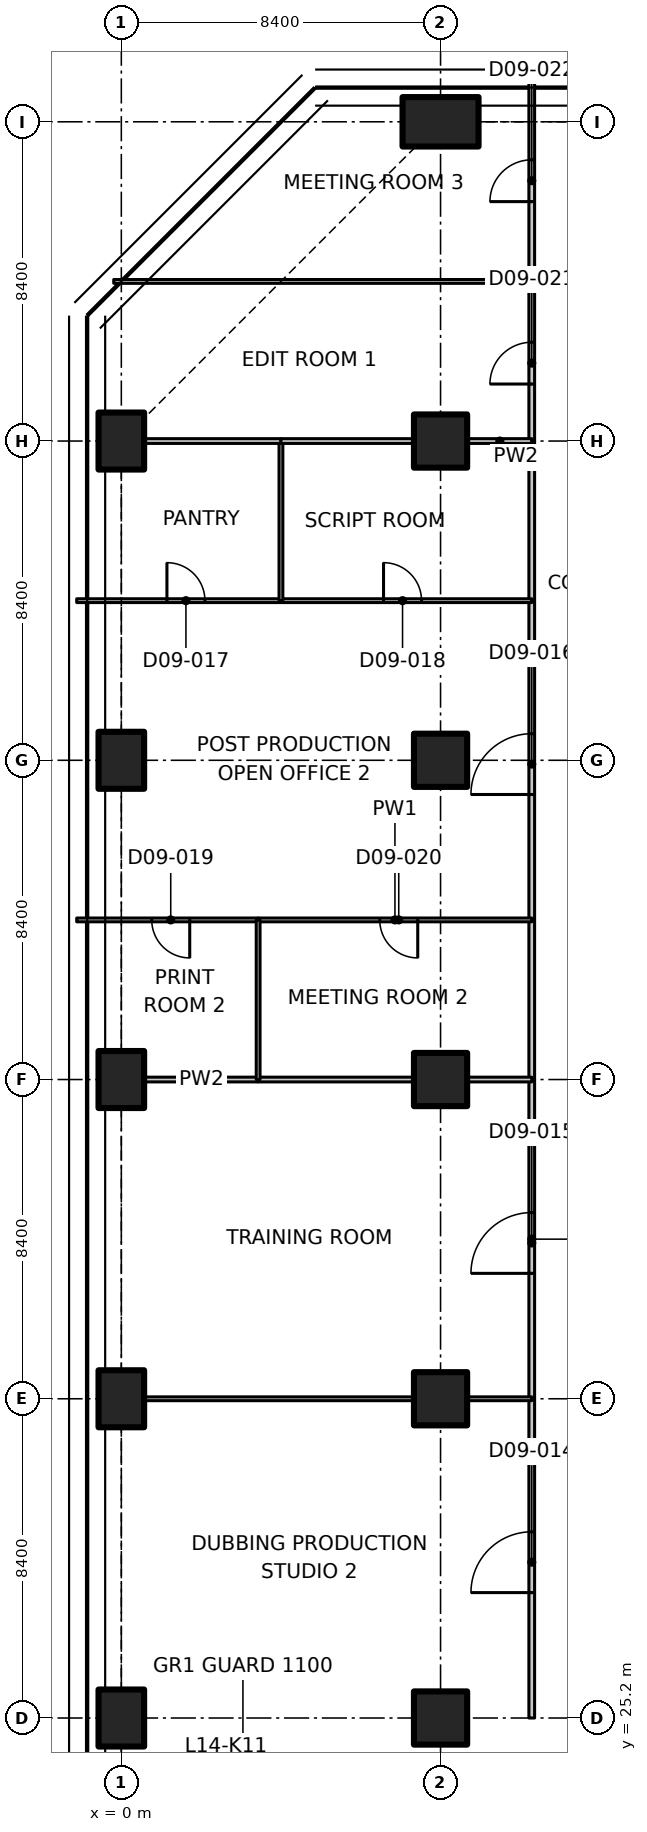
"""IFC4 building model, lengths in metres.
Left out: names, types, materials, properties, quantities, classifications, styles, units other than length and angle.
Written with IfcOpenShell. Run it as: python <this file> out.ifc"""

import sys

from ifc_helpers import new_model, si_unit, direction, frame, frame_2d, origin, origin_2d, place, context, subcontext, project, spatial, polyline, rectangle, outline, extrude, element, fill, save


model = new_model("IFC4")
c1 = context("Model", 3, precision=1e-05, world=origin(), true_north=direction((0.0, 1.0)))
c2 = subcontext(c1, "Body", "Model", "MODEL_VIEW")
j1 = project(units=[si_unit("LENGTHUNIT", "METRE"), si_unit("PLANEANGLEUNIT", "RADIAN")], contexts=[c1])
p1 = place(None, origin())
s1 = spatial("IfcSite", under=j1, at=p1, CompositionType="ELEMENT")
p2 = place(p1, origin())
s2 = spatial("IfcBuilding", under=s1, at=p2, CompositionType="ELEMENT")
p3 = place(p2, frame((0.0, 0.0, 65.3)))
s3 = spatial("IfcBuildingStorey", under=s2, at=p3, CompositionType="ELEMENT", Elevation=65.3)
for number, where, z_axis, x_axis in (
    (1, (0.0, 25.2, 0.0), (0.0, 0.0, 1.0), (1.0, 0.0, 0.0)),
    (2, (0.0, 33.6, 0.0), (0.0, 0.0, 1.0), (1.0, 0.0, 0.0)),
    (3, (0.0, 42.0, 0.0), (0.0, 0.0, 1.0), (1.0, 0.0, 0.0)),
    (4, (0.0, 50.4, 0.0), (0.0, 0.0, 1.0), (1.0, 0.0, 0.0)),
    (5, (0.0, 58.8, 0.0), (0.0, 0.0, 1.0), (1.0, 0.0, 0.0)),
):
    element("IfcColumn", number, at=place(p3, frame(where, z_axis=z_axis, x_axis=x_axis)), inside=s3, PredefinedType="COLUMN", context=c2, shape_type="SweptSolid", body=[
        extrude(rectangle(XDim=1.2, YDim=1.5, at=origin_2d()), origin(), (0.0, 0.0, 1.0), 3.35),
    ])
for number, where, z_axis, x_axis in (
    (6, (8.4, 25.2, 0.0), (0.0, 0.0, 1.0), (1.0, 0.0, 0.0)),
    (7, (8.4, 33.6, 0.0), (0.0, 0.0, 1.0), (1.0, 0.0, 0.0)),
    (8, (8.4, 42.0, 0.0), (0.0, 0.0, 1.0), (1.0, 0.0, 0.0)),
    (9, (8.4, 50.4, 0.0), (0.0, 0.0, 1.0), (1.0, 0.0, 0.0)),
    (10, (8.4, 58.8, 0.0), (0.0, 0.0, 1.0), (1.0, 0.0, 0.0)),
):
    element("IfcColumn", number, at=place(p3, frame(where, z_axis=z_axis, x_axis=x_axis)), inside=s3, PredefinedType="COLUMN", context=c2, shape_type="SweptSolid", body=[
        extrude(rectangle(XDim=1.4, YDim=1.4, at=origin_2d()), origin(), (0.0, 0.0, 1.0), 3.35),
    ])
p4 = place(p3, frame((8.4, 67.2, 0.0), z_axis=(0.0, 0.0, 1.0), x_axis=(0.0, 1.0, 0.0)))
e11 = element("IfcColumn", 11, at=p4, inside=s3, PredefinedType="COLUMN", context=c2, shape_type="SweptSolid", body=[
    extrude(rectangle(XDim=1.3, YDim=2.0, at=origin_2d()), origin(), (0.0, 0.0, 1.0), 3.35),
])
p5 = place(p3, frame((10.8, 25.2, 0.0), z_axis=(0.0, 0.0, 1.0), x_axis=(0.0, 1.0, 0.0)))
e12 = element("IfcWall", 12, at=p5, inside=s3, PredefinedType="PARTITIONING", context=c2, shape_type="SweptSolid", body=[
    extrude(rectangle(XDim=8.4, YDim=0.15, at=frame_2d((4.2, 0.0))), origin(), (0.0, 0.0, 1.0), 3.33),
])
p6 = place(p5, frame((3.3, 0.0, 0.0)))
e13 = element("IfcOpeningElement", 13, at=p6, cuts=e12, PredefinedType="OPENING", context=c2, shape_type="SweptSolid", body=[
    extrude(rectangle(XDim=1.6, YDim=2.1, at=frame_2d((0.8, 1.05))), frame((0.0, 0.085, 0.0), z_axis=(0.0, -1.0, 0.0), x_axis=(1.0, 0.0, 0.0)), (0.0, 0.0, 1.0), 0.17),
])
p7 = place(p3, frame((10.8, 33.6, 0.0), z_axis=(0.0, 0.0, 1.0), x_axis=(0.0, 1.0, 0.0)))
e14 = element("IfcWall", 14, at=p7, inside=s3, PredefinedType="PARTITIONING", context=c2, shape_type="SweptSolid", body=[
    extrude(rectangle(XDim=8.4, YDim=0.15, at=frame_2d((4.2, 0.0))), origin(), (0.0, 0.0, 1.0), 3.33),
])
p8 = place(p7, frame((3.3, 0.0, 0.0)))
e15 = element("IfcOpeningElement", 15, at=p8, cuts=e14, PredefinedType="OPENING", context=c2, shape_type="SweptSolid", body=[
    extrude(rectangle(XDim=1.6, YDim=2.1, at=frame_2d((0.8, 1.05))), frame((0.0, 0.085, 0.0), z_axis=(0.0, -1.0, 0.0), x_axis=(1.0, 0.0, 0.0)), (0.0, 0.0, 1.0), 0.17),
])
p9 = place(p3, frame((10.8, 46.2, 0.0), z_axis=(0.0, 0.0, 1.0), x_axis=(0.0, 1.0, 0.0)))
e16 = element("IfcWall", 16, at=p9, inside=s3, PredefinedType="PARTITIONING", context=c2, shape_type="SweptSolid", body=[
    extrude(rectangle(XDim=8.4, YDim=0.15, at=frame_2d((4.2, 0.0))), origin(), (0.0, 0.0, 1.0), 3.33),
])
p10 = place(p9, frame((3.3, 0.0, 0.0)))
e17 = element("IfcOpeningElement", 17, at=p10, cuts=e16, PredefinedType="OPENING", context=c2, shape_type="SweptSolid", body=[
    extrude(rectangle(XDim=1.6, YDim=2.1, at=frame_2d((0.8, 1.05))), frame((0.0, 0.085, 0.0), z_axis=(0.0, -1.0, 0.0), x_axis=(1.0, 0.0, 0.0)), (0.0, 0.0, 1.0), 0.17),
])
for number, where, z_axis, x_axis in (
    (18, (10.8, 54.6, 0.0), (0.0, 0.0, 1.0), (0.0, 1.0, 0.0)),
    (19, (10.8, 42.0, 0.0), (0.0, 0.0, 1.0), (0.0, 1.0, 0.0)),
):
    element("IfcWall", number, at=place(p3, frame(where, z_axis=z_axis, x_axis=x_axis)), inside=s3, PredefinedType="PARTITIONING", context=c2, shape_type="SweptSolid", body=[
        extrude(rectangle(XDim=4.2, YDim=0.15, at=frame_2d((2.1, 0.0))), origin(), (0.0, 0.0, 1.0), 3.33),
    ])
p11 = place(p3, frame((10.8, 58.8, 0.0), z_axis=(0.0, 0.0, 1.0), x_axis=(0.0, 1.0, 0.0)))
e20 = element("IfcWall", 20, at=p11, inside=s3, PredefinedType="PARTITIONING", context=c2, shape_type="SweptSolid", body=[
    extrude(rectangle(XDim=4.2, YDim=0.15, at=frame_2d((2.1, 0.0))), origin(), (0.0, 0.0, 1.0), 3.33),
])
p12 = place(p11, frame((1.5, 0.0, 0.0)))
e21 = element("IfcOpeningElement", 21, at=p12, cuts=e20, PredefinedType="OPENING", context=c2, shape_type="SweptSolid", body=[
    extrude(rectangle(XDim=1.1, YDim=2.1, at=frame_2d((0.55, 1.05))), frame((0.0, 0.085, 0.0), z_axis=(0.0, -1.0, 0.0), x_axis=(1.0, 0.0, 0.0)), (0.0, 0.0, 1.0), 0.17),
])
p13 = place(p3, frame((10.8, 63.0, 0.0), z_axis=(0.0, 0.0, 1.0), x_axis=(0.0, 1.0, 0.0)))
e22 = element("IfcWall", 22, at=p13, inside=s3, PredefinedType="PARTITIONING", context=c2, shape_type="SweptSolid", body=[
    extrude(outline(polyline([(0.0, 0.0), (5.423, 0.0), (5.423, 3.33), (5.28, 3.33), (4.65, 3.33), (4.648, 2.98), (3.752, 2.98), (3.75, 3.33), (0.0, 3.33), (0.0, 0.0)])), frame((0.0, 0.075, 0.0), z_axis=(0.0, -1.0, 0.0), x_axis=(1.0, 0.0, 0.0)), (0.0, 0.0, 1.0), 0.15),
])
p14 = place(p13, frame((2.1, 0.0, 0.0)))
e23 = element("IfcOpeningElement", 23, at=p14, cuts=e22, PredefinedType="OPENING", context=c2, shape_type="SweptSolid", body=[
    extrude(rectangle(XDim=1.1, YDim=2.1, at=frame_2d((0.55, 1.05))), frame((0.0, 0.085, 0.0), z_axis=(0.0, -1.0, 0.0), x_axis=(1.0, 0.0, 0.0)), (0.0, 0.0, 1.0), 0.17),
])
p15 = place(p3, frame((0.62, 33.6, 0.0), z_axis=(0.0, 0.0, 1.0), x_axis=(1.0, 0.0, 0.0)))
e24 = element("IfcWall", 24, at=p15, inside=s3, PredefinedType="PARTITIONING", context=c2, shape_type="SweptSolid", body=[
    extrude(rectangle(XDim=7.06, YDim=0.1, at=frame_2d((3.53, 0.0))), origin(), (0.0, 0.0, 1.0), 3.33),
])
p16 = place(p3, frame((9.12, 33.6, 0.0), z_axis=(0.0, 0.0, 1.0), x_axis=(1.0, 0.0, 0.0)))
e25 = element("IfcWall", 25, at=p16, inside=s3, PredefinedType="PARTITIONING", context=c2, shape_type="SweptSolid", body=[
    extrude(rectangle(XDim=1.68, YDim=0.1, at=frame_2d((0.84, 0.0))), origin(), (0.0, 0.0, 1.0), 3.33),
])
p17 = place(p3, frame((0.62, 42.0, 0.0), z_axis=(0.0, 0.0, 1.0), x_axis=(1.0, 0.0, 0.0)))
e26 = element("IfcWall", 26, at=p17, inside=s3, PredefinedType="PARTITIONING", context=c2, shape_type="SweptSolid", body=[
    extrude(rectangle(XDim=2.98, YDim=0.125, at=frame_2d((1.49, 0.0))), origin(), (0.0, 0.0, 1.0), 3.33),
])
p18 = place(p3, frame((3.6, 42.0, 0.0), z_axis=(0.0, 0.0, 1.0), x_axis=(1.0, 0.0, 0.0)))
e27 = element("IfcWall", 27, at=p18, inside=s3, PredefinedType="PARTITIONING", context=c2, shape_type="SweptSolid", body=[
    extrude(rectangle(XDim=4.08, YDim=0.125, at=frame_2d((2.04, 0.0))), origin(), (0.0, 0.0, 1.0), 3.33),
])
p19 = place(p3, frame((9.12, 42.0, 0.0), z_axis=(0.0, 0.0, 1.0), x_axis=(1.0, 0.0, 0.0)))
e28 = element("IfcWall", 28, at=p19, inside=s3, PredefinedType="PARTITIONING", context=c2, shape_type="SweptSolid", body=[
    extrude(rectangle(XDim=1.68, YDim=0.125, at=frame_2d((0.84, 0.0))), origin(), (0.0, 0.0, 1.0), 3.33),
])
p20 = place(p3, frame((-1.174, 54.6, 0.0), z_axis=(0.0, 0.0, 1.0), x_axis=(1.0, 0.0, 0.0)))
e29 = element("IfcWall", 29, at=p20, inside=s3, PredefinedType="PARTITIONING", context=c2, shape_type="SweptSolid", body=[
    extrude(outline(polyline([(0.0, 0.0), (5.374, 0.0), (5.374, 3.33), (1.624, 3.33), (1.622, 2.98), (0.726, 2.98), (0.724, 3.33), (0.074, 3.33), (0.0, 3.33), (0.0, 0.0)])), frame((0.0, 0.05, 0.0), z_axis=(0.0, -1.0, 0.0), x_axis=(1.0, 0.0, 0.0)), (0.0, 0.0, 1.0), 0.1),
])
p21 = place(p20, frame((2.374, 0.0, 0.0)))
e30 = element("IfcOpeningElement", 30, at=p21, cuts=e29, PredefinedType="OPENING", context=c2, shape_type="SweptSolid", body=[
    extrude(rectangle(XDim=1.0, YDim=2.1, at=frame_2d((0.5, 1.05))), frame((0.0, 0.06, 0.0), z_axis=(0.0, -1.0, 0.0), x_axis=(1.0, 0.0, 0.0)), (0.0, 0.0, 1.0), 0.12),
])
p22 = place(p3, frame((4.2, 54.6, 0.0), z_axis=(0.0, 0.0, 1.0), x_axis=(1.0, 0.0, 0.0)))
e31 = element("IfcWall", 31, at=p22, inside=s3, PredefinedType="PARTITIONING", context=c2, shape_type="SweptSolid", body=[
    extrude(rectangle(XDim=6.6, YDim=0.1, at=frame_2d((3.3, 0.0))), origin(), (0.0, 0.0, 1.0), 3.33),
])
p23 = place(p22, frame((2.7, 0.0, 0.0)))
e32 = element("IfcOpeningElement", 32, at=p23, cuts=e31, PredefinedType="OPENING", context=c2, shape_type="SweptSolid", body=[
    extrude(rectangle(XDim=1.0, YDim=2.1, at=frame_2d((0.5, 1.05))), frame((0.0, 0.06, 0.0), z_axis=(0.0, -1.0, 0.0), x_axis=(1.0, 0.0, 0.0)), (0.0, 0.0, 1.0), 0.12),
])
p24 = place(p3, frame((3.6, 46.2, 0.0), z_axis=(0.0, 0.0, 1.0), x_axis=(-1.0, 0.0, 0.0)))
e33 = element("IfcWall", 33, at=p24, inside=s3, PredefinedType="PARTITIONING", context=c2, shape_type="SweptSolid", body=[
    extrude(outline(polyline([(0.0, 0.0), (4.774, 0.0), (4.774, 3.33), (4.7, 3.33), (4.05, 3.33), (4.048, 2.98), (3.152, 2.98), (3.15, 3.33), (0.0, 3.33), (0.0, 0.0)])), frame((0.0, 0.05, 0.0), z_axis=(0.0, -1.0, 0.0), x_axis=(1.0, 0.0, 0.0)), (0.0, 0.0, 1.0), 0.1),
])
p25 = place(p24, frame((1.8, 0.0, 0.0)))
e34 = element("IfcOpeningElement", 34, at=p25, cuts=e33, PredefinedType="OPENING", context=c2, shape_type="SweptSolid", body=[
    extrude(rectangle(XDim=1.0, YDim=2.1, at=frame_2d((0.5, 1.05))), frame((0.0, 0.06, 0.0), z_axis=(0.0, -1.0, 0.0), x_axis=(1.0, 0.0, 0.0)), (0.0, 0.0, 1.0), 0.12),
])
p26 = place(p3, frame((10.8, 46.2, 0.0), z_axis=(0.0, 0.0, 1.0), x_axis=(-1.0, 0.0, 0.0)))
e35 = element("IfcWall", 35, at=p26, inside=s3, PredefinedType="PARTITIONING", context=c2, shape_type="SweptSolid", body=[
    extrude(rectangle(XDim=7.2, YDim=0.1, at=frame_2d((3.6, 0.0))), origin(), (0.0, 0.0, 1.0), 3.33),
])
p27 = place(p26, frame((3.0, 0.0, 0.0)))
e36 = element("IfcOpeningElement", 36, at=p27, cuts=e35, PredefinedType="OPENING", context=c2, shape_type="SweptSolid", body=[
    extrude(rectangle(XDim=1.0, YDim=2.1, at=frame_2d((0.5, 1.05))), frame((0.0, 0.06, 0.0), z_axis=(0.0, -1.0, 0.0), x_axis=(1.0, 0.0, 0.0)), (0.0, 0.0, 1.0), 0.12),
])
p28 = place(p3, frame((4.2, 58.8, 0.0), z_axis=(0.0, 0.0, 1.0), x_axis=(0.0, -1.0, 0.0)))
e37 = element("IfcWall", 37, at=p28, inside=s3, PredefinedType="PARTITIONING", context=c2, shape_type="SweptSolid", body=[
    extrude(rectangle(XDim=4.2, YDim=0.1, at=frame_2d((2.1, 0.0))), origin(), (0.0, 0.0, 1.0), 3.33),
])
p29 = place(p3, frame((0.62, 58.8, 0.0), z_axis=(0.0, 0.0, 1.0), x_axis=(1.0, 0.0, 0.0)))
e38 = element("IfcWall", 38, at=p29, inside=s3, PredefinedType="PARTITIONING", context=c2, shape_type="SweptSolid", body=[
    extrude(rectangle(XDim=3.58, YDim=0.125, at=frame_2d((1.79, 0.0))), origin(), (0.0, 0.0, 1.0), 3.33),
])
p30 = place(p3, frame((4.2, 58.8, 0.0), z_axis=(0.0, 0.0, 1.0), x_axis=(1.0, 0.0, 0.0)))
e39 = element("IfcWall", 39, at=p30, inside=s3, PredefinedType="PARTITIONING", context=c2, shape_type="SweptSolid", body=[
    extrude(rectangle(XDim=3.48, YDim=0.125, at=frame_2d((1.74, 0.0))), origin(), (0.0, 0.0, 1.0), 3.33),
])
p31 = place(p3, frame((9.12, 58.8, 0.0), z_axis=(0.0, 0.0, 1.0), x_axis=(1.0, 0.0, 0.0)))
e40 = element("IfcWall", 40, at=p31, inside=s3, PredefinedType="PARTITIONING", context=c2, shape_type="SweptSolid", body=[
    extrude(rectangle(XDim=1.68, YDim=0.125, at=frame_2d((0.84, 0.0))), origin(), (0.0, 0.0, 1.0), 3.33),
])
p32 = place(p3, frame((3.6, 46.2, 0.0), z_axis=(0.0, 0.0, 1.0), x_axis=(0.0, -1.0, 0.0)))
e41 = element("IfcWall", 41, at=p32, inside=s3, PredefinedType="PARTITIONING", context=c2, shape_type="SweptSolid", body=[
    extrude(rectangle(XDim=4.2, YDim=0.1, at=frame_2d((2.1, 0.0))), origin(), (0.0, 0.0, 1.0), 3.33),
])
p33 = place(p3, frame((-0.2, 63.0, 0.0), z_axis=(0.0, 0.0, 1.0), x_axis=(1.0, 0.0, 0.0)))
e42 = element("IfcWall", 42, at=p33, inside=s3, PredefinedType="PARTITIONING", context=c2, shape_type="SweptSolid", body=[
    extrude(outline(polyline([(0.0, 0.0), (11.0, 0.0), (11.0, 3.33), (5.066, 3.33), (5.064, 2.98), (3.736, 2.98), (3.734, 3.33), (0.0, 3.33), (0.0, 0.0)])), frame((0.0, 0.05, 0.0), z_axis=(0.0, -1.0, 0.0), x_axis=(1.0, 0.0, 0.0)), (0.0, 0.0, 1.0), 0.1),
])
p34 = place(p6, origin())
e43 = element("IfcDoor", 43, at=p34, inside=s3, OperationType="DOUBLE_DOOR_SINGLE_SWING", PredefinedType="DOOR", context=c2, shape_type="SweptSolid", body=[
    extrude(rectangle(XDim=1.6, YDim=2.1, at=frame_2d((0.8, 1.05))), frame((0.0, 0.025, 0.0), z_axis=(0.0, -1.0, 0.0), x_axis=(1.0, 0.0, 0.0)), (0.0, 0.0, 1.0), 0.05),
])
fill(e13, e43)
p35 = place(p8, origin())
e44 = element("IfcDoor", 44, at=p35, inside=s3, OperationType="DOUBLE_DOOR_SINGLE_SWING", PredefinedType="DOOR", context=c2, shape_type="SweptSolid", body=[
    extrude(rectangle(XDim=1.6, YDim=2.1, at=frame_2d((0.8, 1.05))), frame((0.0, 0.025, 0.0), z_axis=(0.0, -1.0, 0.0), x_axis=(1.0, 0.0, 0.0)), (0.0, 0.0, 1.0), 0.05),
])
fill(e15, e44)
p36 = place(p10, origin())
e45 = element("IfcDoor", 45, at=p36, inside=s3, OperationType="DOUBLE_DOOR_SINGLE_SWING", PredefinedType="DOOR", context=c2, shape_type="SweptSolid", body=[
    extrude(rectangle(XDim=1.6, YDim=2.1, at=frame_2d((0.8, 1.05))), frame((0.0, 0.025, 0.0), z_axis=(0.0, -1.0, 0.0), x_axis=(1.0, 0.0, 0.0)), (0.0, 0.0, 1.0), 0.05),
])
fill(e17, e45)
p37 = place(p21, origin())
e46 = element("IfcDoor", 46, at=p37, inside=s3, OperationType="SINGLE_SWING_LEFT", PredefinedType="DOOR", context=c2, shape_type="SweptSolid", body=[
    extrude(rectangle(XDim=1.0, YDim=2.1, at=frame_2d((0.5, 1.05))), frame((0.0, 0.025, 0.0), z_axis=(0.0, -1.0, 0.0), x_axis=(1.0, 0.0, 0.0)), (0.0, 0.0, 1.0), 0.05),
])
fill(e30, e46)
p38 = place(p23, origin())
e47 = element("IfcDoor", 47, at=p38, inside=s3, OperationType="SINGLE_SWING_LEFT", PredefinedType="DOOR", context=c2, shape_type="SweptSolid", body=[
    extrude(rectangle(XDim=1.0, YDim=2.1, at=frame_2d((0.5, 1.05))), frame((0.0, 0.025, 0.0), z_axis=(0.0, -1.0, 0.0), x_axis=(1.0, 0.0, 0.0)), (0.0, 0.0, 1.0), 0.05),
])
fill(e32, e47)
p39 = place(p25, origin())
e48 = element("IfcDoor", 48, at=p39, inside=s3, OperationType="SINGLE_SWING_LEFT", PredefinedType="DOOR", context=c2, shape_type="SweptSolid", body=[
    extrude(rectangle(XDim=1.0, YDim=2.1, at=frame_2d((0.5, 1.05))), frame((0.0, 0.025, 0.0), z_axis=(0.0, -1.0, 0.0), x_axis=(1.0, 0.0, 0.0)), (0.0, 0.0, 1.0), 0.05),
])
fill(e34, e48)
p40 = place(p27, origin())
e49 = element("IfcDoor", 49, at=p40, inside=s3, OperationType="SINGLE_SWING_LEFT", PredefinedType="DOOR", context=c2, shape_type="SweptSolid", body=[
    extrude(rectangle(XDim=1.0, YDim=2.1, at=frame_2d((0.5, 1.05))), frame((0.0, 0.025, 0.0), z_axis=(0.0, -1.0, 0.0), x_axis=(1.0, 0.0, 0.0)), (0.0, 0.0, 1.0), 0.05),
])
fill(e36, e49)
p41 = place(p12, origin())
e50 = element("IfcDoor", 50, at=p41, inside=s3, OperationType="SINGLE_SWING_LEFT", PredefinedType="DOOR", context=c2, shape_type="SweptSolid", body=[
    extrude(rectangle(XDim=1.1, YDim=2.1, at=frame_2d((0.55, 1.05))), frame((0.0, 0.025, 0.0), z_axis=(0.0, -1.0, 0.0), x_axis=(1.0, 0.0, 0.0)), (0.0, 0.0, 1.0), 0.05),
])
fill(e21, e50)
p42 = place(p14, origin())
e51 = element("IfcDoor", 51, at=p42, inside=s3, OperationType="SINGLE_SWING_LEFT", PredefinedType="DOOR", context=c2, shape_type="SweptSolid", body=[
    extrude(rectangle(XDim=1.1, YDim=2.1, at=frame_2d((0.55, 1.05))), frame((0.0, 0.025, 0.0), z_axis=(0.0, -1.0, 0.0), x_axis=(1.0, 0.0, 0.0)), (0.0, 0.0, 1.0), 0.05),
])
fill(e23, e51)
save(model, sys.argv[1])
